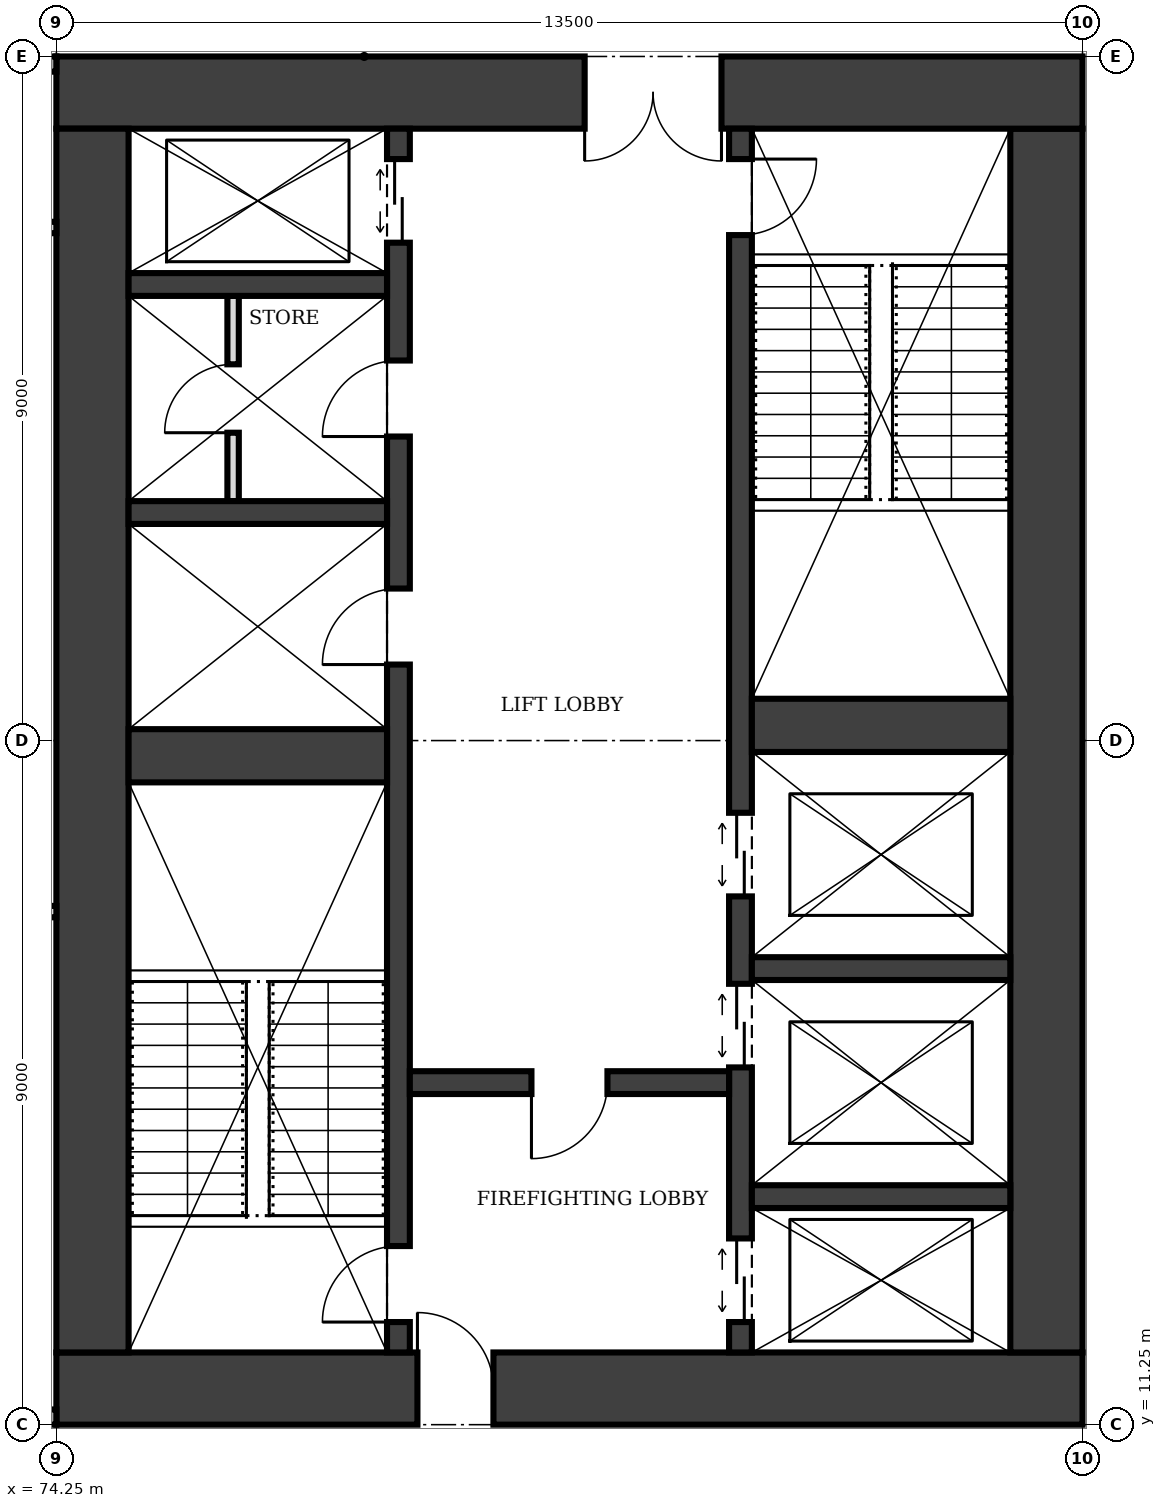
"""IFC4 building model, lengths in metres.
Left out: names, types, materials, properties, quantities, classifications, styles, units other than length and angle.
Written with IfcOpenShell. Run it as: python <this file> out.ifc"""

import sys

from ifc_helpers import new_model, si_unit, direction, frame, frame_2d, origin, place, context, subcontext, project, spatial, rectangle, extrude, element, fill, save


model = new_model("IFC4")
c1 = context("Model", 3, precision=1e-05, world=origin(), true_north=direction((0.0, 1.0)))
c2 = subcontext(c1, "Body", "Model", "MODEL_VIEW")
j1 = project(units=[si_unit("LENGTHUNIT", "METRE"), si_unit("PLANEANGLEUNIT", "RADIAN")], contexts=[c1])
p1 = place(None, origin())
s1 = spatial("IfcSite", under=j1, at=p1, CompositionType="ELEMENT")
p2 = place(p1, origin())
s2 = spatial("IfcBuilding", under=s1, at=p2, CompositionType="ELEMENT")
p3 = place(p2, frame((0.0, 0.0, 141.0)))
s3 = spatial("IfcBuildingStorey", under=s2, at=p3, CompositionType="ELEMENT", Elevation=141.0)
p4 = place(p3, frame((74.25, 11.725, 0.0), z_axis=(0.0, 0.0, 1.0), x_axis=(1.0, 0.0, 0.0)))
e1 = element("IfcWall", 1, at=p4, inside=s3, PredefinedType="SHEAR", context=c2, shape_type="SweptSolid", body=[
    extrude(rectangle(XDim=13.5, YDim=0.95, at=frame_2d((6.75, 0.0))), origin(), (0.0, 0.0, 1.0), 4.0),
])
p5 = place(p4, frame((4.75, 0.0, 0.0)))
e2 = element("IfcOpeningElement", 2, at=p5, cuts=e1, PredefinedType="OPENING", context=c2, shape_type="SweptSolid", body=[
    extrude(rectangle(XDim=1.0, YDim=2.1, at=frame_2d((0.5, 1.05))), frame((0.0, 0.485, 0.0), z_axis=(0.0, -1.0, 0.0), x_axis=(1.0, 0.0, 0.0)), (0.0, 0.0, 1.0), 0.97),
])
p6 = place(p3, frame((87.275, 12.2, 0.0), z_axis=(0.0, 0.0, 1.0), x_axis=(0.0, 1.0, 0.0)))
e3 = element("IfcWall", 3, at=p6, inside=s3, PredefinedType="SHEAR", context=c2, shape_type="SweptSolid", body=[
    extrude(rectangle(XDim=16.1, YDim=0.95, at=frame_2d((8.05, 0.0))), origin(), (0.0, 0.0, 1.0), 4.0),
])
p7 = place(p3, frame((87.75, 28.775, 0.0), z_axis=(0.0, 0.0, 1.0), x_axis=(-1.0, 0.0, 0.0)))
e4 = element("IfcWall", 4, at=p7, inside=s3, PredefinedType="SHEAR", context=c2, shape_type="SweptSolid", body=[
    extrude(rectangle(XDim=13.5, YDim=0.95, at=frame_2d((6.75, 0.0))), origin(), (0.0, 0.0, 1.0), 4.0),
])
p8 = place(p7, frame((4.75, 0.0, 0.0)))
e5 = element("IfcOpeningElement", 5, at=p8, cuts=e4, PredefinedType="OPENING", context=c2, shape_type="SweptSolid", body=[
    extrude(rectangle(XDim=1.8, YDim=2.1, at=frame_2d((0.9, 1.05))), frame((0.0, 0.485, 0.0), z_axis=(0.0, -1.0, 0.0), x_axis=(1.0, 0.0, 0.0)), (0.0, 0.0, 1.0), 0.97),
])
p9 = place(p3, frame((74.725, 28.3, 0.0), z_axis=(0.0, 0.0, 1.0), x_axis=(0.0, -1.0, 0.0)))
e6 = element("IfcWall", 6, at=p9, inside=s3, PredefinedType="SHEAR", context=c2, shape_type="SweptSolid", body=[
    extrude(rectangle(XDim=16.1, YDim=0.95, at=frame_2d((8.05, 0.0))), origin(), (0.0, 0.0, 1.0), 4.0),
])
p10 = place(p3, frame((78.75, 12.2, 0.0), z_axis=(0.0, 0.0, 1.0), x_axis=(0.0, 1.0, 0.0)))
e7 = element("IfcWall", 7, at=p10, inside=s3, PredefinedType="SHEAR", context=c2, shape_type="SweptSolid", body=[
    extrude(rectangle(XDim=16.1, YDim=0.3, at=frame_2d((8.05, 0.0))), origin(), (0.0, 0.0, 1.0), 4.0),
])
p11 = place(p10, frame((0.4, 0.0, 0.0)))
e8 = element("IfcOpeningElement", 8, at=p11, cuts=e7, PredefinedType="OPENING", context=c2, shape_type="SweptSolid", body=[
    extrude(rectangle(XDim=1.0, YDim=2.1, at=frame_2d((0.5, 1.05))), frame((0.0, 0.16, 0.0), z_axis=(0.0, -1.0, 0.0), x_axis=(1.0, 0.0, 0.0)), (0.0, 0.0, 1.0), 0.32),
])
p12 = place(p10, frame((14.6, 0.0, 0.0)))
e9 = element("IfcOpeningElement", 9, at=p12, cuts=e7, PredefinedType="OPENING", context=c2, shape_type="SweptSolid", body=[
    extrude(rectangle(XDim=1.1, YDim=2.1, at=frame_2d((0.55, 1.05))), frame((0.0, 0.16, 0.0), z_axis=(0.0, -1.0, 0.0), x_axis=(1.0, 0.0, 0.0)), (0.0, 0.0, 1.0), 0.32),
])
p13 = place(p10, frame((9.05, 0.0, 0.0)))
e10 = element("IfcOpeningElement", 10, at=p13, cuts=e7, PredefinedType="OPENING", context=c2, shape_type="SweptSolid", body=[
    extrude(rectangle(XDim=1.0, YDim=2.1, at=frame_2d((0.5, 1.05))), frame((0.0, 0.16, 0.0), z_axis=(0.0, -1.0, 0.0), x_axis=(1.0, 0.0, 0.0)), (0.0, 0.0, 1.0), 0.32),
])
p14 = place(p10, frame((12.05, 0.0, 0.0)))
e11 = element("IfcOpeningElement", 11, at=p14, cuts=e7, PredefinedType="OPENING", context=c2, shape_type="SweptSolid", body=[
    extrude(rectangle(XDim=1.0, YDim=2.1, at=frame_2d((0.5, 1.05))), frame((0.0, 0.16, 0.0), z_axis=(0.0, -1.0, 0.0), x_axis=(1.0, 0.0, 0.0)), (0.0, 0.0, 1.0), 0.32),
])
p15 = place(p3, frame((83.25, 12.2, 0.0), z_axis=(0.0, 0.0, 1.0), x_axis=(0.0, 1.0, 0.0)))
e12 = element("IfcWall", 12, at=p15, inside=s3, PredefinedType="SHEAR", context=c2, shape_type="SweptSolid", body=[
    extrude(rectangle(XDim=16.1, YDim=0.3, at=frame_2d((8.05, 0.0))), origin(), (0.0, 0.0, 1.0), 4.0),
])
p16 = place(p15, frame((14.7, 0.0, 0.0)))
e13 = element("IfcOpeningElement", 13, at=p16, cuts=e12, PredefinedType="OPENING", context=c2, shape_type="SweptSolid", body=[
    extrude(rectangle(XDim=1.0, YDim=2.1, at=frame_2d((0.5, 1.05))), frame((0.0, 0.16, 0.0), z_axis=(0.0, -1.0, 0.0), x_axis=(1.0, 0.0, 0.0)), (0.0, 0.0, 1.0), 0.32),
])
p17 = place(p15, frame((0.4, 0.0, 0.0)))
e14 = element("IfcOpeningElement", 14, at=p17, cuts=e12, PredefinedType="OPENING", context=c2, shape_type="SweptSolid", body=[
    extrude(rectangle(XDim=1.1, YDim=2.1, at=frame_2d((0.55, 1.05))), frame((0.0, 0.16, 0.0), z_axis=(0.0, -1.0, 0.0), x_axis=(1.0, 0.0, 0.0)), (0.0, 0.0, 1.0), 0.32),
])
p18 = place(p15, frame((3.75, 0.0, 0.0)))
e15 = element("IfcOpeningElement", 15, at=p18, cuts=e12, PredefinedType="OPENING", context=c2, shape_type="SweptSolid", body=[
    extrude(rectangle(XDim=1.1, YDim=2.1, at=frame_2d((0.55, 1.05))), frame((0.0, 0.16, 0.0), z_axis=(0.0, -1.0, 0.0), x_axis=(1.0, 0.0, 0.0)), (0.0, 0.0, 1.0), 0.32),
])
p19 = place(p15, frame((6.0, 0.0, 0.0)))
e16 = element("IfcOpeningElement", 16, at=p19, cuts=e12, PredefinedType="OPENING", context=c2, shape_type="SweptSolid", body=[
    extrude(rectangle(XDim=1.1, YDim=2.1, at=frame_2d((0.55, 1.05))), frame((0.0, 0.16, 0.0), z_axis=(0.0, -1.0, 0.0), x_axis=(1.0, 0.0, 0.0)), (0.0, 0.0, 1.0), 0.32),
])
p20 = place(p3, frame((75.2, 20.05, 0.0), z_axis=(0.0, 0.0, 1.0), x_axis=(1.0, 0.0, 0.0)))
e17 = element("IfcWall", 17, at=p20, inside=s3, PredefinedType="SHEAR", context=c2, shape_type="SweptSolid", body=[
    extrude(rectangle(XDim=3.4, YDim=0.7, at=frame_2d((1.7, 0.0))), origin(), (0.0, 0.0, 1.0), 4.0),
])
p21 = place(p3, frame((78.9, 15.75, 0.0), z_axis=(0.0, 0.0, 1.0), x_axis=(1.0, 0.0, 0.0)))
e18 = element("IfcWall", 18, at=p21, inside=s3, PredefinedType="SHEAR", context=c2, shape_type="SweptSolid", body=[
    extrude(rectangle(XDim=4.2, YDim=0.3, at=frame_2d((2.1, 0.0))), origin(), (0.0, 0.0, 1.0), 4.0),
])
p22 = place(p21, frame((1.6, 0.0, 0.0)))
e19 = element("IfcOpeningElement", 19, at=p22, cuts=e18, PredefinedType="OPENING", context=c2, shape_type="SweptSolid", body=[
    extrude(rectangle(XDim=1.0, YDim=2.1, at=frame_2d((0.5, 1.05))), frame((0.0, 0.16, 0.0), z_axis=(0.0, -1.0, 0.0), x_axis=(1.0, 0.0, 0.0)), (0.0, 0.0, 1.0), 0.32),
])
for number, where, z_axis, x_axis in (
    (20, (83.4, 14.25, 0.0), (0.0, 0.0, 1.0), (1.0, 0.0, 0.0)),
    (21, (83.4, 17.25, 0.0), (0.0, 0.0, 1.0), (1.0, 0.0, 0.0)),
):
    element("IfcWall", number, at=place(p3, frame(where, z_axis=z_axis, x_axis=x_axis)), inside=s3, PredefinedType="SHEAR", context=c2, shape_type="SweptSolid", body=[
        extrude(rectangle(XDim=3.4, YDim=0.3, at=frame_2d((1.7, 0.0))), origin(), (0.0, 0.0, 1.0), 4.0),
    ])
p23 = place(p3, frame((83.4, 20.45, 0.0), z_axis=(0.0, 0.0, 1.0), x_axis=(1.0, 0.0, 0.0)))
e22 = element("IfcWall", 22, at=p23, inside=s3, PredefinedType="SHEAR", context=c2, shape_type="SweptSolid", body=[
    extrude(rectangle(XDim=3.4, YDim=0.7, at=frame_2d((1.7, 0.0))), origin(), (0.0, 0.0, 1.0), 4.0),
])
for number, where, z_axis, x_axis in (
    (23, (75.2, 23.25, 0.0), (0.0, 0.0, 1.0), (1.0, 0.0, 0.0)),
    (24, (75.2, 26.25, 0.0), (0.0, 0.0, 1.0), (1.0, 0.0, 0.0)),
):
    element("IfcWall", number, at=place(p3, frame(where, z_axis=z_axis, x_axis=x_axis)), inside=s3, PredefinedType="SHEAR", context=c2, shape_type="SweptSolid", body=[
        extrude(rectangle(XDim=3.4, YDim=0.3, at=frame_2d((1.7, 0.0))), origin(), (0.0, 0.0, 1.0), 4.0),
    ])
p24 = place(p3, frame((76.575, 23.4, 0.0), z_axis=(0.0, 0.0, 1.0), x_axis=(0.0, 1.0, 0.0)))
e25 = element("IfcWall", 25, at=p24, inside=s3, PredefinedType="PARTITIONING", context=c2, shape_type="SweptSolid", body=[
    extrude(rectangle(XDim=2.7, YDim=0.15, at=frame_2d((1.35, 0.0))), origin(), (0.0, 0.0, 1.0), 3.75),
])
p25 = place(p24, frame((0.9, 0.0, 0.0)))
e26 = element("IfcOpeningElement", 26, at=p25, cuts=e25, PredefinedType="OPENING", context=c2, shape_type="SweptSolid", body=[
    extrude(rectangle(XDim=0.9, YDim=2.1, at=frame_2d((0.45, 1.05))), frame((0.0, 0.085, 0.0), z_axis=(0.0, -1.0, 0.0), x_axis=(1.0, 0.0, 0.0)), (0.0, 0.0, 1.0), 0.17),
])
for number, where, z_axis, x_axis in (
    (27, (68.47, 11.35, 0.0), (0.0, 0.0, 1.0), (1.0, 0.0, 0.0)),
    (28, (68.47, 29.15, 0.0), (0.0, 0.0, 1.0), (1.0, 0.0, 0.0)),
):
    element("IfcWall", number, at=place(p3, frame(where, z_axis=z_axis, x_axis=x_axis)), inside=s3, PredefinedType="SOLIDWALL", context=c2, shape_type="SweptSolid", body=[
        extrude(rectangle(XDim=5.78, YDim=0.2, at=frame_2d((2.89, 0.0))), origin(), (0.0, 0.0, 1.0), 2.85),
    ])
for number, where, z_axis, x_axis in (
    (29, (65.15, 18.0, 0.0), (0.0, 0.0, 1.0), (1.0, 0.0, 0.0)),
    (30, (65.15, 27.0, 0.0), (0.0, 0.0, 1.0), (1.0, 0.0, 0.0)),
):
    element("IfcWall", number, at=place(p3, frame(where, z_axis=z_axis, x_axis=x_axis)), inside=s3, PredefinedType="PARTITIONING", context=c2, shape_type="SweptSolid", body=[
        extrude(rectangle(XDim=9.1, YDim=0.15, at=frame_2d((4.55, 0.0))), origin(), (0.0, 0.0, 1.0), 3.75),
    ])
p26 = place(p5, origin())
e31 = element("IfcDoor", 31, at=p26, inside=s3, OperationType="SINGLE_SWING_LEFT", PredefinedType="DOOR", context=c2, shape_type="SweptSolid", body=[
    extrude(rectangle(XDim=1.0, YDim=2.1, at=frame_2d((0.5, 1.05))), frame((0.0, 0.025, 0.0), z_axis=(0.0, -1.0, 0.0), x_axis=(1.0, 0.0, 0.0)), (0.0, 0.0, 1.0), 0.05),
])
fill(e2, e31)
p27 = place(p8, origin())
e32 = element("IfcDoor", 32, at=p27, inside=s3, OperationType="DOUBLE_DOOR_SINGLE_SWING", PredefinedType="DOOR", context=c2, shape_type="SweptSolid", body=[
    extrude(rectangle(XDim=1.8, YDim=2.1, at=frame_2d((0.9, 1.05))), frame((0.0, 0.025, 0.0), z_axis=(0.0, -1.0, 0.0), x_axis=(1.0, 0.0, 0.0)), (0.0, 0.0, 1.0), 0.05),
])
fill(e5, e32)
p28 = place(p22, frame((1.0, 0.0, 0.0), z_axis=(0.0, 0.0, 1.0), x_axis=(-1.0, 0.0, 0.0)))
e33 = element("IfcDoor", 33, at=p28, inside=s3, OperationType="SINGLE_SWING_RIGHT", PredefinedType="DOOR", context=c2, shape_type="SweptSolid", body=[
    extrude(rectangle(XDim=1.0, YDim=2.1, at=frame_2d((0.5, 1.05))), frame((0.0, 0.025, 0.0), z_axis=(0.0, -1.0, 0.0), x_axis=(1.0, 0.0, 0.0)), (0.0, 0.0, 1.0), 0.05),
])
fill(e19, e33)
p29 = place(p11, origin())
e34 = element("IfcDoor", 34, at=p29, inside=s3, OperationType="SINGLE_SWING_LEFT", PredefinedType="DOOR", context=c2, shape_type="SweptSolid", body=[
    extrude(rectangle(XDim=1.0, YDim=2.1, at=frame_2d((0.5, 1.05))), frame((0.0, 0.025, 0.0), z_axis=(0.0, -1.0, 0.0), x_axis=(1.0, 0.0, 0.0)), (0.0, 0.0, 1.0), 0.05),
])
fill(e8, e34)
p30 = place(p16, frame((1.0, 0.0, 0.0), z_axis=(0.0, 0.0, 1.0), x_axis=(-1.0, 0.0, 0.0)))
e35 = element("IfcDoor", 35, at=p30, inside=s3, OperationType="SINGLE_SWING_LEFT", PredefinedType="DOOR", context=c2, shape_type="SweptSolid", body=[
    extrude(rectangle(XDim=1.0, YDim=2.1, at=frame_2d((0.5, 1.05))), frame((0.0, 0.025, 0.0), z_axis=(0.0, -1.0, 0.0), x_axis=(1.0, 0.0, 0.0)), (0.0, 0.0, 1.0), 0.05),
])
fill(e13, e35)
p31 = place(p17, origin())
e36 = element("IfcDoor", 36, at=p31, inside=s3, OperationType="DOUBLE_DOOR_SLIDING", PredefinedType="DOOR", context=c2, shape_type="SweptSolid", body=[
    extrude(rectangle(XDim=1.1, YDim=2.1, at=frame_2d((0.55, 1.05))), frame((0.0, 0.025, 0.0), z_axis=(0.0, -1.0, 0.0), x_axis=(1.0, 0.0, 0.0)), (0.0, 0.0, 1.0), 0.05),
])
fill(e14, e36)
p32 = place(p12, origin())
e37 = element("IfcDoor", 37, at=p32, inside=s3, OperationType="DOUBLE_DOOR_SLIDING", PredefinedType="DOOR", context=c2, shape_type="SweptSolid", body=[
    extrude(rectangle(XDim=1.1, YDim=2.1, at=frame_2d((0.55, 1.05))), frame((0.0, 0.025, 0.0), z_axis=(0.0, -1.0, 0.0), x_axis=(1.0, 0.0, 0.0)), (0.0, 0.0, 1.0), 0.05),
])
fill(e9, e37)
p33 = place(p18, origin())
e38 = element("IfcDoor", 38, at=p33, inside=s3, OperationType="DOUBLE_DOOR_SLIDING", PredefinedType="DOOR", context=c2, shape_type="SweptSolid", body=[
    extrude(rectangle(XDim=1.1, YDim=2.1, at=frame_2d((0.55, 1.05))), frame((0.0, 0.025, 0.0), z_axis=(0.0, -1.0, 0.0), x_axis=(1.0, 0.0, 0.0)), (0.0, 0.0, 1.0), 0.05),
])
fill(e15, e38)
p34 = place(p19, origin())
e39 = element("IfcDoor", 39, at=p34, inside=s3, OperationType="DOUBLE_DOOR_SLIDING", PredefinedType="DOOR", context=c2, shape_type="SweptSolid", body=[
    extrude(rectangle(XDim=1.1, YDim=2.1, at=frame_2d((0.55, 1.05))), frame((0.0, 0.025, 0.0), z_axis=(0.0, -1.0, 0.0), x_axis=(1.0, 0.0, 0.0)), (0.0, 0.0, 1.0), 0.05),
])
fill(e16, e39)
p35 = place(p13, origin())
e40 = element("IfcDoor", 40, at=p35, inside=s3, OperationType="SINGLE_SWING_LEFT", PredefinedType="DOOR", context=c2, shape_type="SweptSolid", body=[
    extrude(rectangle(XDim=1.0, YDim=2.1, at=frame_2d((0.5, 1.05))), frame((0.0, 0.025, 0.0), z_axis=(0.0, -1.0, 0.0), x_axis=(1.0, 0.0, 0.0)), (0.0, 0.0, 1.0), 0.05),
])
fill(e10, e40)
p36 = place(p14, origin())
e41 = element("IfcDoor", 41, at=p36, inside=s3, OperationType="SINGLE_SWING_LEFT", PredefinedType="DOOR", context=c2, shape_type="SweptSolid", body=[
    extrude(rectangle(XDim=1.0, YDim=2.1, at=frame_2d((0.5, 1.05))), frame((0.0, 0.025, 0.0), z_axis=(0.0, -1.0, 0.0), x_axis=(1.0, 0.0, 0.0)), (0.0, 0.0, 1.0), 0.05),
])
fill(e11, e41)
p37 = place(p25, origin())
e42 = element("IfcDoor", 42, at=p37, inside=s3, OperationType="SINGLE_SWING_LEFT", PredefinedType="DOOR", context=c2, shape_type="SweptSolid", body=[
    extrude(rectangle(XDim=0.9, YDim=2.1, at=frame_2d((0.45, 1.05))), frame((0.0, 0.025, 0.0), z_axis=(0.0, -1.0, 0.0), x_axis=(1.0, 0.0, 0.0)), (0.0, 0.0, 1.0), 0.05),
])
fill(e26, e42)
save(model, sys.argv[1])
